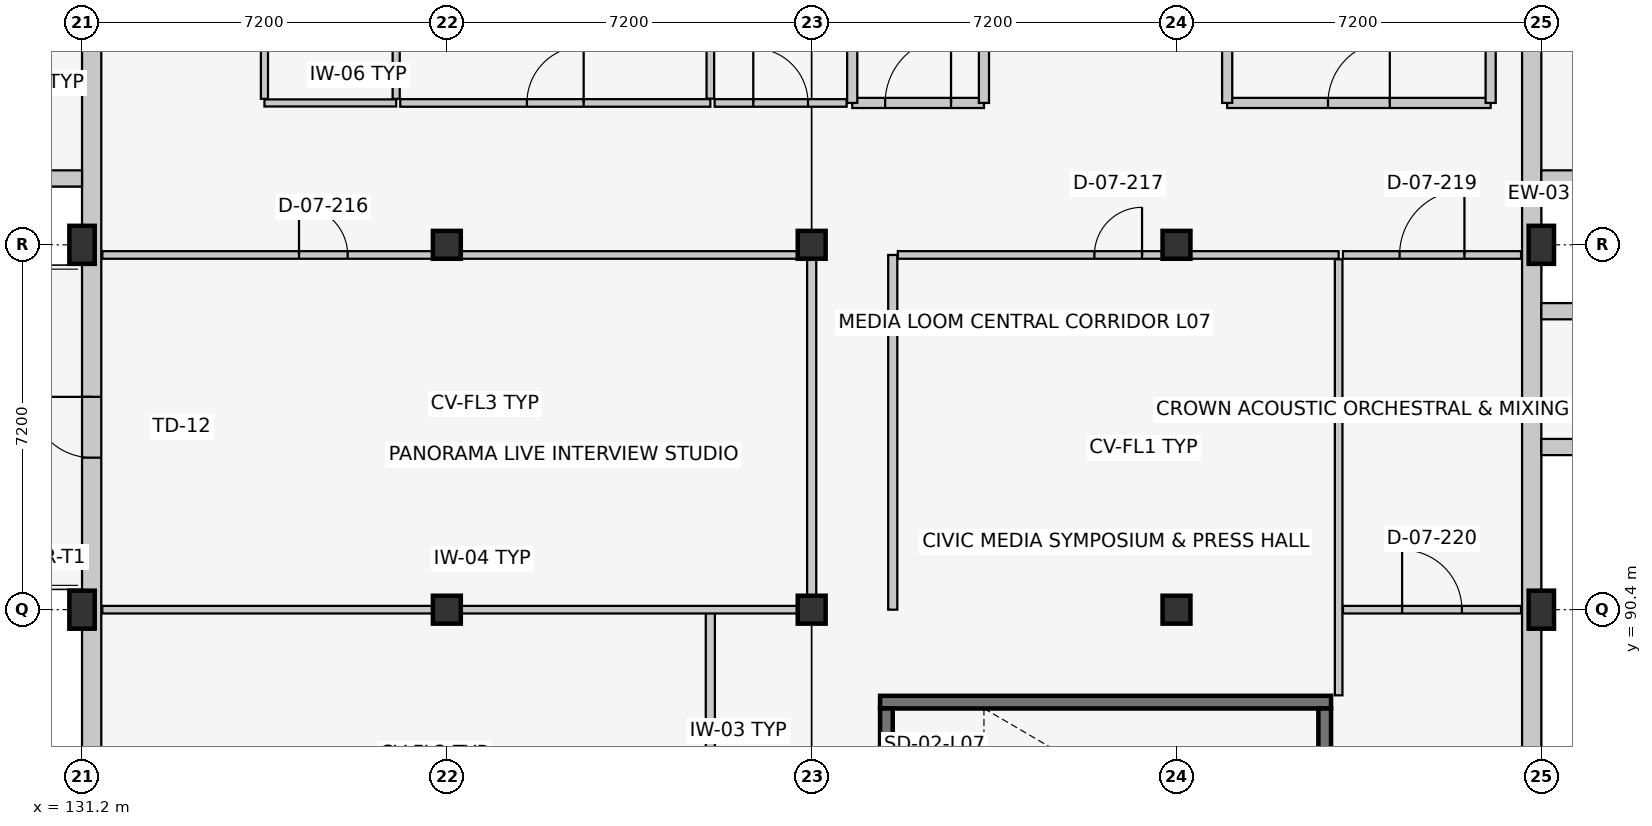
"""IFC4 building model, lengths in metres.
Left out: names, types, materials, properties, quantities, classifications, styles, units other than length and angle.
Written with IfcOpenShell. Run it as: python <this file> out.ifc"""

import sys

from ifc_helpers import new_model, si_unit, direction, frame, frame_2d, origin, origin_2d, place, context, subcontext, project, spatial, rectangle, extrude, element, fill, save


model = new_model("IFC4")
c1 = context("Model", 3, precision=1e-05, world=origin(), true_north=direction((0.0, 1.0)))
c2 = subcontext(c1, "Body", "Model", "MODEL_VIEW")
j1 = project(units=[si_unit("LENGTHUNIT", "METRE"), si_unit("PLANEANGLEUNIT", "RADIAN")], contexts=[c1])
p1 = place(None, origin())
s1 = spatial("IfcSite", under=j1, at=p1, CompositionType="ELEMENT")
p2 = place(p1, origin())
s2 = spatial("IfcBuilding", under=s1, at=p2, CompositionType="ELEMENT")
p3 = place(p2, frame((0.0, 0.0, 29.7)))
s3 = spatial("IfcBuildingStorey", under=s2, at=p3, CompositionType="ELEMENT", Elevation=29.7)
for number, where, z_axis, x_axis in (
    (1, (131.2, 90.4, 0.0), (0.0, 0.0, 1.0), (1.0, 0.0, 0.0)),
    (2, (131.2, 97.6, 0.0), (0.0, 0.0, 1.0), (1.0, 0.0, 0.0)),
):
    element("IfcColumn", number, at=place(p3, frame(where, z_axis=z_axis, x_axis=x_axis)), inside=s3, PredefinedType="COLUMN", context=c2, shape_type="SweptSolid", body=[
        extrude(rectangle(XDim=0.5, YDim=0.75, at=origin_2d()), origin(), (0.0, 0.0, 1.0), 4.2),
    ])
for number, where, z_axis, x_axis in (
    (3, (138.4, 90.4, 0.0), (0.0, 0.0, 1.0), (1.0, 0.0, 0.0)),
    (4, (138.4, 97.6, 0.0), (0.0, 0.0, 1.0), (1.0, 0.0, 0.0)),
    (5, (145.6, 90.4, 0.0), (0.0, 0.0, 1.0), (1.0, 0.0, 0.0)),
    (6, (145.6, 97.6, 0.0), (0.0, 0.0, 1.0), (1.0, 0.0, 0.0)),
    (7, (152.8, 90.4, 0.0), (0.0, 0.0, 1.0), (1.0, 0.0, 0.0)),
    (8, (152.8, 97.6, 0.0), (0.0, 0.0, 1.0), (1.0, 0.0, 0.0)),
):
    element("IfcColumn", number, at=place(p3, frame(where, z_axis=z_axis, x_axis=x_axis)), inside=s3, PredefinedType="COLUMN", context=c2, shape_type="SweptSolid", body=[
        extrude(rectangle(XDim=0.55, YDim=0.55, at=origin_2d()), origin(), (0.0, 0.0, 1.0), 4.2),
    ])
for number, where, z_axis, x_axis in (
    (9, (160.0, 90.4, 0.0), (0.0, 0.0, 1.0), (1.0, 0.0, 0.0)),
    (10, (160.0, 97.6, 0.0), (0.0, 0.0, 1.0), (1.0, 0.0, 0.0)),
):
    element("IfcColumn", number, at=place(p3, frame(where, z_axis=z_axis, x_axis=x_axis)), inside=s3, PredefinedType="COLUMN", context=c2, shape_type="SweptSolid", body=[
        extrude(rectangle(XDim=0.5, YDim=0.75, at=origin_2d()), origin(), (0.0, 0.0, 1.0), 4.2),
    ])
p4 = place(p3, frame((159.81, 112.0, 0.0), z_axis=(0.0, 0.0, 1.0), x_axis=(0.0, -1.0, 0.0)))
e11 = element("IfcWall", 11, at=p4, inside=s3, PredefinedType="SOLIDWALL", context=c2, shape_type="SweptSolid", body=[
    extrude(rectangle(XDim=28.8, YDim=0.38, at=frame_2d((14.4, 0.0))), origin(), (0.0, 0.0, 1.0), 3.455),
])
p5 = place(p3, frame((160.0, 93.61, 0.0), z_axis=(0.0, 0.0, 1.0), x_axis=(1.0, 0.0, 0.0)))
e12 = element("IfcWall", 12, at=p5, inside=s3, PredefinedType="SOLIDWALL", context=c2, shape_type="SweptSolid", body=[
    extrude(rectangle(XDim=1.793, YDim=0.32, at=frame_2d((0.896, 0.0))), origin(), (0.0, 0.0, 1.0), 4.18),
])
for number, where, z_axis, x_axis in (
    (13, (160.0, 96.29, 0.0), (0.0, 0.0, 1.0), (1.0, 0.0, 0.0)),
    (14, (160.0, 98.91, 0.0), (0.0, 0.0, 1.0), (1.0, 0.0, 0.0)),
):
    element("IfcWall", number, at=place(p3, frame(where, z_axis=z_axis, x_axis=x_axis)), inside=s3, PredefinedType="SOLIDWALL", context=c2, shape_type="SweptSolid", body=[
        extrude(rectangle(XDim=1.35, YDim=0.32, at=frame_2d((0.675, 0.0))), origin(), (0.0, 0.0, 1.0), 4.18),
    ])
p6 = place(p3, frame((131.39, 83.2, 0.0), z_axis=(0.0, 0.0, 1.0), x_axis=(0.0, 1.0, 0.0)))
e15 = element("IfcWall", 15, at=p6, inside=s3, PredefinedType="SOLIDWALL", context=c2, shape_type="SweptSolid", body=[
    extrude(rectangle(XDim=28.8, YDim=0.38, at=frame_2d((14.4, 0.0))), origin(), (0.0, 0.0, 1.0), 3.455),
])
p7 = place(p6, frame((10.2, 0.0, 0.0)))
e16 = element("IfcOpeningElement", 16, at=p7, cuts=e15, PredefinedType="OPENING", context=c2, shape_type="SweptSolid", body=[
    extrude(rectangle(XDim=1.2, YDim=2.15, at=frame_2d((0.6, 1.075))), frame((0.0, 0.202, 0.0), z_axis=(0.0, -1.0, 0.0), x_axis=(1.0, 0.0, 0.0)), (0.0, 0.0, 1.0), 0.404),
])
p8 = place(p3, frame((131.2, 98.91, 0.0), z_axis=(0.0, 0.0, 1.0), x_axis=(-1.0, 0.0, 0.0)))
e17 = element("IfcWall", 17, at=p8, inside=s3, PredefinedType="SOLIDWALL", context=c2, shape_type="SweptSolid", body=[
    extrude(rectangle(XDim=1.793, YDim=0.32, at=frame_2d((0.896, 0.0))), origin(), (0.0, 0.0, 1.0), 4.18),
])
p9 = place(p3, frame((155.85, 88.575, 0.0), z_axis=(0.0, 0.0, 1.0), x_axis=(-1.0, 0.0, 0.0)))
e18 = element("IfcWall", 18, at=p9, inside=s3, PredefinedType="SHEAR", context=c2, shape_type="SweptSolid", body=[
    extrude(rectangle(XDim=8.9, YDim=0.25, at=frame_2d((4.45, 0.0))), origin(), (0.0, 0.0, 1.0), 4.2),
])
p10 = place(p3, frame((147.075, 88.45, 0.0), z_axis=(0.0, 0.0, 1.0), x_axis=(0.0, -1.0, 0.0)))
e19 = element("IfcWall", 19, at=p10, inside=s3, PredefinedType="SHEAR", context=c2, shape_type="SweptSolid", body=[
    extrude(rectangle(XDim=3.85, YDim=0.25, at=frame_2d((1.925, 0.0))), origin(), (0.0, 0.0, 1.0), 4.2),
])
p11 = place(p10, frame((1.325, 0.0, 0.0)))
e20 = element("IfcOpeningElement", 20, at=p11, cuts=e19, PredefinedType="OPENING", context=c2, shape_type="SweptSolid", body=[
    extrude(rectangle(XDim=1.2, YDim=2.15, at=frame_2d((0.6, 1.075))), frame((0.0, 0.137, 0.0), z_axis=(0.0, -1.0, 0.0), x_axis=(1.0, 0.0, 0.0)), (0.0, 0.0, 1.0), 0.274),
])
p12 = place(p3, frame((155.725, 84.6, 0.0), z_axis=(0.0, 0.0, 1.0), x_axis=(0.0, 1.0, 0.0)))
e21 = element("IfcWall", 21, at=p12, inside=s3, PredefinedType="SHEAR", context=c2, shape_type="SweptSolid", body=[
    extrude(rectangle(XDim=3.85, YDim=0.25, at=frame_2d((1.925, 0.0))), origin(), (0.0, 0.0, 1.0), 4.2),
])
p13 = place(p3, frame((146.4, 100.4, 0.0), z_axis=(0.0, 0.0, 1.0), x_axis=(1.0, 0.0, 0.0)))
e22 = element("IfcWall", 22, at=p13, inside=s3, PredefinedType="PARTITIONING", context=c2, shape_type="SweptSolid", body=[
    extrude(rectangle(XDim=2.6, YDim=0.2, at=frame_2d((1.3, 0.0))), origin(), (0.0, 0.0, 1.0), 4.2),
])
p14 = place(p13, frame((0.65, 0.0, 0.0)))
e23 = element("IfcOpeningElement", 23, at=p14, cuts=e22, PredefinedType="OPENING", context=c2, shape_type="SweptSolid", body=[
    extrude(rectangle(XDim=1.3, YDim=2.2, at=frame_2d((0.65, 1.1))), frame((0.0, 0.112, 0.0), z_axis=(0.0, -1.0, 0.0), x_axis=(1.0, 0.0, 0.0)), (0.0, 0.0, 1.0), 0.224),
])
for number, where, z_axis, x_axis in (
    (24, (146.4, 106.2, 0.0), (0.0, 0.0, 1.0), (0.0, -1.0, 0.0)),
    (25, (149.0, 100.4, 0.0), (0.0, 0.0, 1.0), (0.0, 1.0, 0.0)),
):
    element("IfcWall", number, at=place(p3, frame(where, z_axis=z_axis, x_axis=x_axis)), inside=s3, PredefinedType="PARTITIONING", context=c2, shape_type="SweptSolid", body=[
        extrude(rectangle(XDim=5.8, YDim=0.2, at=frame_2d((2.9, 0.0))), origin(), (0.0, 0.0, 1.0), 4.2),
    ])
p15 = place(p3, frame((153.8, 100.4, 0.0), z_axis=(0.0, 0.0, 1.0), x_axis=(1.0, 0.0, 0.0)))
e26 = element("IfcWall", 26, at=p15, inside=s3, PredefinedType="PARTITIONING", context=c2, shape_type="SweptSolid", body=[
    extrude(rectangle(XDim=5.2, YDim=0.2, at=frame_2d((2.6, 0.0))), origin(), (0.0, 0.0, 1.0), 4.2),
])
p16 = place(p15, frame((1.99, 0.0, 0.0)))
e27 = element("IfcOpeningElement", 27, at=p16, cuts=e26, PredefinedType="OPENING", context=c2, shape_type="SweptSolid", body=[
    extrude(rectangle(XDim=1.22, YDim=2.2, at=frame_2d((0.61, 1.1))), frame((0.0, 0.112, 0.0), z_axis=(0.0, -1.0, 0.0), x_axis=(1.0, 0.0, 0.0)), (0.0, 0.0, 1.0), 0.224),
])
for number, where, z_axis, x_axis in (
    (28, (153.8, 106.2, 0.0), (0.0, 0.0, 1.0), (0.0, -1.0, 0.0)),
    (29, (159.0, 100.4, 0.0), (0.0, 0.0, 1.0), (0.0, 1.0, 0.0)),
):
    element("IfcWall", number, at=place(p3, frame(where, z_axis=z_axis, x_axis=x_axis)), inside=s3, PredefinedType="PARTITIONING", context=c2, shape_type="SweptSolid", body=[
        extrude(rectangle(XDim=5.8, YDim=0.2, at=frame_2d((2.9, 0.0))), origin(), (0.0, 0.0, 1.0), 4.2),
    ])
p17 = place(p3, frame((143.6, 83.6, 0.0), z_axis=(0.0, 0.0, 1.0), x_axis=(0.0, 1.0, 0.0)))
e30 = element("IfcWall", 30, at=p17, inside=s3, PredefinedType="PARTITIONING", context=c2, shape_type="SweptSolid", body=[
    extrude(rectangle(XDim=6.8, YDim=0.18, at=frame_2d((3.4, 0.0))), origin(), (0.0, 0.0, 1.0), 4.2),
])
p18 = place(p17, frame((2.94, 0.0, 0.0)))
e31 = element("IfcOpeningElement", 31, at=p18, cuts=e30, PredefinedType="OPENING", context=c2, shape_type="SweptSolid", body=[
    extrude(rectangle(XDim=0.92, YDim=2.08, at=frame_2d((0.46, 1.04))), frame((0.0, 0.102, 0.0), z_axis=(0.0, -1.0, 0.0), x_axis=(1.0, 0.0, 0.0)), (0.0, 0.0, 1.0), 0.204),
])
p19 = place(p3, frame((145.6, 90.4, 0.0), z_axis=(0.0, 0.0, 1.0), x_axis=(0.0, 1.0, 0.0)))
e32 = element("IfcWall", 32, at=p19, inside=s3, PredefinedType="PARTITIONING", context=c2, shape_type="SweptSolid", body=[
    extrude(rectangle(XDim=7.0, YDim=0.18, at=frame_2d((3.5, 0.0))), origin(), (0.0, 0.0, 1.0), 3.575),
])
p20 = place(p3, frame((147.2, 90.4, 0.0), z_axis=(0.0, 0.0, 1.0), x_axis=(0.0, 1.0, 0.0)))
e33 = element("IfcWall", 33, at=p20, inside=s3, PredefinedType="PARTITIONING", context=c2, shape_type="SweptSolid", body=[
    extrude(rectangle(XDim=7.0, YDim=0.18, at=frame_2d((3.5, 0.0))), origin(), (0.0, 0.0, 1.0), 4.2),
])
p21 = place(p3, frame((134.8, 100.4, 0.0), z_axis=(0.0, 0.0, 1.0), x_axis=(1.0, 0.0, 0.0)))
e34 = element("IfcWall", 34, at=p21, inside=s3, PredefinedType="PARTITIONING", context=c2, shape_type="SweptSolid", body=[
    extrude(rectangle(XDim=2.6, YDim=0.14, at=frame_2d((1.3, 0.0))), origin(), (0.0, 0.0, 1.0), 4.2),
])
p22 = place(p3, frame((134.8, 100.48, 0.0), z_axis=(0.0, 0.0, 1.0), x_axis=(0.0, 1.0, 0.0)))
e35 = element("IfcWall", 35, at=p22, inside=s3, PredefinedType="PARTITIONING", context=c2, shape_type="SweptSolid", body=[
    extrude(rectangle(XDim=4.86, YDim=0.14, at=frame_2d((2.43, 0.0))), origin(), (0.0, 0.0, 1.0), 4.2),
])
p23 = place(p22, frame((1.9, 0.0, 0.0)))
e36 = element("IfcOpeningElement", 36, at=p23, cuts=e35, PredefinedType="OPENING", context=c2, shape_type="SweptSolid", body=[
    extrude(rectangle(XDim=1.06, YDim=2.1, at=frame_2d((0.53, 1.05))), frame((0.0, 0.082, 0.0), z_axis=(0.0, -1.0, 0.0), x_axis=(1.0, 0.0, 0.0)), (0.0, 0.0, 1.0), 0.164),
])
p24 = place(p3, frame((137.4, 100.48, 0.0), z_axis=(0.0, 0.0, 1.0), x_axis=(0.0, 1.0, 0.0)))
e37 = element("IfcWall", 37, at=p24, inside=s3, PredefinedType="PARTITIONING", context=c2, shape_type="SweptSolid", body=[
    extrude(rectangle(XDim=4.86, YDim=0.14, at=frame_2d((2.43, 0.0))), origin(), (0.0, 0.0, 1.0), 4.2),
])
p25 = place(p3, frame((131.6, 90.4, 0.0), z_axis=(0.0, 0.0, 1.0), x_axis=(1.0, 0.0, 0.0)))
e38 = element("IfcWall", 38, at=p25, inside=s3, PredefinedType="PARTITIONING", context=c2, shape_type="SweptSolid", body=[
    extrude(rectangle(XDim=13.9, YDim=0.15, at=frame_2d((6.95, 0.0))), origin(), (0.0, 0.0, 1.0), 3.525),
])
p26 = place(p3, frame((131.6, 97.4, 0.0), z_axis=(0.0, 0.0, 1.0), x_axis=(1.0, 0.0, 0.0)))
e39 = element("IfcWall", 39, at=p26, inside=s3, PredefinedType="PARTITIONING", context=c2, shape_type="SweptSolid", body=[
    extrude(rectangle(XDim=13.9, YDim=0.15, at=frame_2d((6.95, 0.0))), origin(), (0.0, 0.0, 1.0), 3.525),
])
p27 = place(p26, frame((3.882, 0.0, 0.0)))
e40 = element("IfcOpeningElement", 40, at=p27, cuts=e39, PredefinedType="OPENING", context=c2, shape_type="SweptSolid", body=[
    extrude(rectangle(XDim=0.96, YDim=2.1, at=frame_2d((0.48, 1.05))), frame((0.0, 0.087, 0.0), z_axis=(0.0, -1.0, 0.0), x_axis=(1.0, 0.0, 0.0)), (0.0, 0.0, 1.0), 0.174),
])
p28 = place(p3, frame((147.3, 97.4, 0.0), z_axis=(0.0, 0.0, 1.0), x_axis=(1.0, 0.0, 0.0)))
e41 = element("IfcWall", 41, at=p28, inside=s3, PredefinedType="PARTITIONING", context=c2, shape_type="SweptSolid", body=[
    extrude(rectangle(XDim=8.7, YDim=0.15, at=frame_2d((4.35, 0.0))), origin(), (0.0, 0.0, 1.0), 3.375),
])
p29 = place(p28, frame((3.88, 0.0, 0.0)))
e42 = element("IfcOpeningElement", 42, at=p29, cuts=e41, PredefinedType="OPENING", context=c2, shape_type="SweptSolid", body=[
    extrude(rectangle(XDim=0.94, YDim=2.1, at=frame_2d((0.47, 1.05))), frame((0.0, 0.087, 0.0), z_axis=(0.0, -1.0, 0.0), x_axis=(1.0, 0.0, 0.0)), (0.0, 0.0, 1.0), 0.174),
])
p30 = place(p3, frame((156.0, 88.71, 0.0), z_axis=(0.0, 0.0, 1.0), x_axis=(0.0, 1.0, 0.0)))
e43 = element("IfcWall", 43, at=p30, inside=s3, PredefinedType="PARTITIONING", context=c2, shape_type="SweptSolid", body=[
    extrude(rectangle(XDim=8.605, YDim=0.15, at=frame_2d((4.302, 0.0))), origin(), (0.0, 0.0, 1.0), 4.2),
])
p31 = place(p3, frame((156.085, 90.4, 0.0), z_axis=(0.0, 0.0, 1.0), x_axis=(1.0, 0.0, 0.0)))
e44 = element("IfcWall", 44, at=p31, inside=s3, PredefinedType="PARTITIONING", context=c2, shape_type="SweptSolid", body=[
    extrude(rectangle(XDim=3.515, YDim=0.15, at=frame_2d((1.758, 0.0))), origin(), (0.0, 0.0, 1.0), 3.375),
])
p32 = place(p31, frame((1.167, 0.0, 0.0)))
e45 = element("IfcOpeningElement", 45, at=p32, cuts=e44, PredefinedType="OPENING", context=c2, shape_type="SweptSolid", body=[
    extrude(rectangle(XDim=1.18, YDim=2.2, at=frame_2d((0.59, 1.1))), frame((0.0, 0.087, 0.0), z_axis=(0.0, -1.0, 0.0), x_axis=(1.0, 0.0, 0.0)), (0.0, 0.0, 1.0), 0.174),
])
p33 = place(p3, frame((156.085, 97.4, 0.0), z_axis=(0.0, 0.0, 1.0), x_axis=(1.0, 0.0, 0.0)))
e46 = element("IfcWall", 46, at=p33, inside=s3, PredefinedType="PARTITIONING", context=c2, shape_type="SweptSolid", body=[
    extrude(rectangle(XDim=3.515, YDim=0.15, at=frame_2d((1.758, 0.0))), origin(), (0.0, 0.0, 1.0), 3.375),
])
p34 = place(p33, frame((1.117, 0.0, 0.0)))
e47 = element("IfcOpeningElement", 47, at=p34, cuts=e46, PredefinedType="OPENING", context=c2, shape_type="SweptSolid", body=[
    extrude(rectangle(XDim=1.28, YDim=2.2, at=frame_2d((0.64, 1.1))), frame((0.0, 0.087, 0.0), z_axis=(0.0, -1.0, 0.0), x_axis=(1.0, 0.0, 0.0)), (0.0, 0.0, 1.0), 0.174),
])
p35 = place(p3, frame((137.48, 100.4, 0.0), z_axis=(0.0, 0.0, 1.0), x_axis=(1.0, 0.0, 0.0)))
e48 = element("IfcWall", 48, at=p35, inside=s3, PredefinedType="PARTITIONING", context=c2, shape_type="SweptSolid", body=[
    extrude(rectangle(XDim=6.12, YDim=0.15, at=frame_2d((3.06, 0.0))), origin(), (0.0, 0.0, 1.0), 4.2),
])
p36 = place(p35, frame((2.5, 0.0, 0.0)))
e49 = element("IfcOpeningElement", 49, at=p36, cuts=e48, PredefinedType="OPENING", context=c2, shape_type="SweptSolid", body=[
    extrude(rectangle(XDim=1.12, YDim=2.15, at=frame_2d((0.56, 1.075))), frame((0.0, 0.087, 0.0), z_axis=(0.0, -1.0, 0.0), x_axis=(1.0, 0.0, 0.0)), (0.0, 0.0, 1.0), 0.174),
])
p37 = place(p3, frame((143.6, 100.485, 0.0), z_axis=(0.0, 0.0, 1.0), x_axis=(0.0, 1.0, 0.0)))
e50 = element("IfcWall", 50, at=p37, inside=s3, PredefinedType="PARTITIONING", context=c2, shape_type="SweptSolid", body=[
    extrude(rectangle(XDim=4.715, YDim=0.15, at=frame_2d((2.357, 0.0))), origin(), (0.0, 0.0, 1.0), 4.2),
])
p38 = place(p3, frame((143.685, 100.4, 0.0), z_axis=(0.0, 0.0, 1.0), x_axis=(1.0, 0.0, 0.0)))
e51 = element("IfcWall", 51, at=p38, inside=s3, PredefinedType="PARTITIONING", context=c2, shape_type="SweptSolid", body=[
    extrude(rectangle(XDim=2.605, YDim=0.15, at=frame_2d((1.302, 0.0))), origin(), (0.0, 0.0, 1.0), 4.2),
])
p39 = place(p38, frame((0.762, 0.0, 0.0)))
e52 = element("IfcOpeningElement", 52, at=p39, cuts=e51, PredefinedType="OPENING", context=c2, shape_type="SweptSolid", body=[
    extrude(rectangle(XDim=1.08, YDim=2.15, at=frame_2d((0.54, 1.075))), frame((0.0, 0.087, 0.0), z_axis=(0.0, -1.0, 0.0), x_axis=(1.0, 0.0, 0.0)), (0.0, 0.0, 1.0), 0.174),
])
p40 = place(p7, origin())
e53 = element("IfcDoor", 53, at=p40, inside=s3, OperationType="SINGLE_SWING_RIGHT", PredefinedType="DOOR", context=c2, shape_type="SweptSolid", body=[
    extrude(rectangle(XDim=1.2, YDim=2.15, at=frame_2d((0.6, 1.075))), frame((0.0, 0.025, 0.0), z_axis=(0.0, -1.0, 0.0), x_axis=(1.0, 0.0, 0.0)), (0.0, 0.0, 1.0), 0.05),
])
fill(e16, e53)
p41 = place(p14, origin())
e54 = element("IfcDoor", 54, at=p41, inside=s3, OperationType="SINGLE_SWING_RIGHT", PredefinedType="DOOR", context=c2, shape_type="SweptSolid", body=[
    extrude(rectangle(XDim=1.3, YDim=2.2, at=frame_2d((0.65, 1.1))), frame((0.0, 0.025, 0.0), z_axis=(0.0, -1.0, 0.0), x_axis=(1.0, 0.0, 0.0)), (0.0, 0.0, 1.0), 0.05),
])
fill(e23, e54)
p42 = place(p16, origin())
e55 = element("IfcDoor", 55, at=p42, inside=s3, OperationType="SINGLE_SWING_RIGHT", PredefinedType="DOOR", context=c2, shape_type="SweptSolid", body=[
    extrude(rectangle(XDim=1.22, YDim=2.2, at=frame_2d((0.61, 1.1))), frame((0.0, 0.025, 0.0), z_axis=(0.0, -1.0, 0.0), x_axis=(1.0, 0.0, 0.0)), (0.0, 0.0, 1.0), 0.05),
])
fill(e27, e55)
p43 = place(p27, origin())
e56 = element("IfcDoor", 56, at=p43, inside=s3, OperationType="SINGLE_SWING_LEFT", PredefinedType="DOOR", context=c2, shape_type="SweptSolid", body=[
    extrude(rectangle(XDim=0.96, YDim=2.1, at=frame_2d((0.48, 1.05))), frame((0.0, 0.025, 0.0), z_axis=(0.0, -1.0, 0.0), x_axis=(1.0, 0.0, 0.0)), (0.0, 0.0, 1.0), 0.05),
])
fill(e40, e56)
p44 = place(p29, origin())
e57 = element("IfcDoor", 57, at=p44, inside=s3, OperationType="SINGLE_SWING_RIGHT", PredefinedType="DOOR", context=c2, shape_type="SweptSolid", body=[
    extrude(rectangle(XDim=0.94, YDim=2.1, at=frame_2d((0.47, 1.05))), frame((0.0, 0.025, 0.0), z_axis=(0.0, -1.0, 0.0), x_axis=(1.0, 0.0, 0.0)), (0.0, 0.0, 1.0), 0.05),
])
fill(e42, e57)
p45 = place(p34, origin())
e58 = element("IfcDoor", 58, at=p45, inside=s3, OperationType="SINGLE_SWING_RIGHT", PredefinedType="DOOR", context=c2, shape_type="SweptSolid", body=[
    extrude(rectangle(XDim=1.28, YDim=2.2, at=frame_2d((0.64, 1.1))), frame((0.0, 0.025, 0.0), z_axis=(0.0, -1.0, 0.0), x_axis=(1.0, 0.0, 0.0)), (0.0, 0.0, 1.0), 0.05),
])
fill(e47, e58)
p46 = place(p32, origin())
e59 = element("IfcDoor", 59, at=p46, inside=s3, OperationType="SINGLE_SWING_LEFT", PredefinedType="DOOR", context=c2, shape_type="SweptSolid", body=[
    extrude(rectangle(XDim=1.18, YDim=2.2, at=frame_2d((0.59, 1.1))), frame((0.0, 0.025, 0.0), z_axis=(0.0, -1.0, 0.0), x_axis=(1.0, 0.0, 0.0)), (0.0, 0.0, 1.0), 0.05),
])
fill(e45, e59)
p47 = place(p36, origin())
e60 = element("IfcDoor", 60, at=p47, inside=s3, OperationType="SINGLE_SWING_RIGHT", PredefinedType="DOOR", context=c2, shape_type="SweptSolid", body=[
    extrude(rectangle(XDim=1.12, YDim=2.15, at=frame_2d((0.56, 1.075))), frame((0.0, 0.025, 0.0), z_axis=(0.0, -1.0, 0.0), x_axis=(1.0, 0.0, 0.0)), (0.0, 0.0, 1.0), 0.05),
])
fill(e49, e60)
p48 = place(p39, origin())
e61 = element("IfcDoor", 61, at=p48, inside=s3, OperationType="SINGLE_SWING_LEFT", PredefinedType="DOOR", context=c2, shape_type="SweptSolid", body=[
    extrude(rectangle(XDim=1.08, YDim=2.15, at=frame_2d((0.54, 1.075))), frame((0.0, 0.025, 0.0), z_axis=(0.0, -1.0, 0.0), x_axis=(1.0, 0.0, 0.0)), (0.0, 0.0, 1.0), 0.05),
])
fill(e52, e61)
save(model, sys.argv[1])
